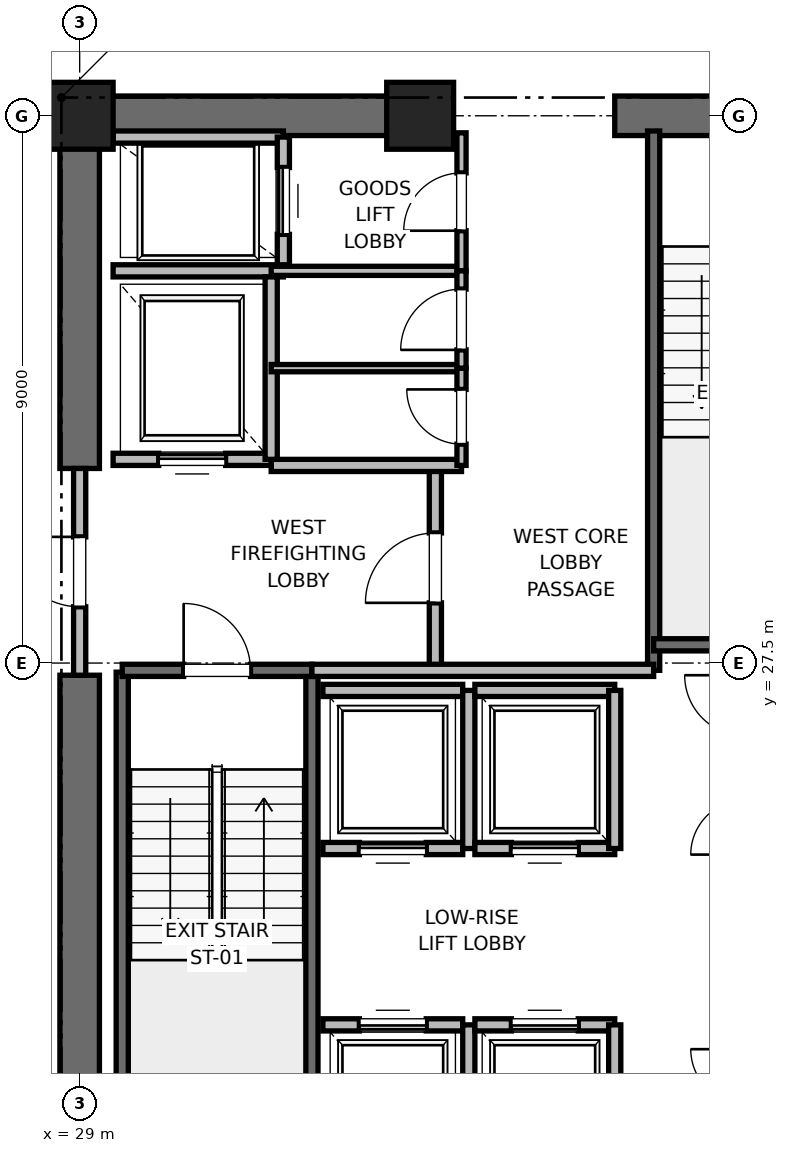
"""IFC4 building model, lengths in metres.
Left out: names, types, materials, properties, quantities, classifications, styles, units other than length and angle.
Written with IfcOpenShell. Run it as: python <this file> out.ifc"""

import sys

from ifc_helpers import new_model, si_unit, direction, frame, frame_2d, origin, origin_2d, place, context, subcontext, project, spatial, rectangle, extrude, element, fill, save


model = new_model("IFC4")
c1 = context("Model", 3, precision=1e-05, world=origin(), true_north=direction((0.0, 1.0)))
c2 = subcontext(c1, "Body", "Model", "MODEL_VIEW")
j1 = project(units=[si_unit("LENGTHUNIT", "METRE"), si_unit("PLANEANGLEUNIT", "RADIAN")], contexts=[c1])
p1 = place(None, origin())
s1 = spatial("IfcSite", under=j1, at=p1, CompositionType="ELEMENT")
p2 = place(p1, origin())
s2 = spatial("IfcBuilding", under=s1, at=p2, CompositionType="ELEMENT")
p3 = place(p2, frame((0.0, 0.0, 75.6)))
s3 = spatial("IfcBuildingStorey", under=s2, at=p3, CompositionType="ELEMENT", Elevation=75.6)
for number, where, z_axis, x_axis in (
    (1, (29.0, 36.5, 0.0), (0.0, 0.0, 1.0), (1.0, 0.0, 0.0)),
    (2, (34.6, 36.5, 0.0), (0.0, 0.0, 1.0), (1.0, 0.0, 0.0)),
):
    element("IfcColumn", number, at=place(p3, frame(where, z_axis=z_axis, x_axis=x_axis)), inside=s3, PredefinedType="PILASTER", context=c2, shape_type="SweptSolid", body=[
        extrude(rectangle(XDim=1.1, YDim=1.1, at=origin_2d()), origin(), (0.0, 0.0, 1.0), 4.0),
    ])
p4 = place(p3, frame((29.0, 36.5, 0.0), z_axis=(0.0, 0.0, 1.0), x_axis=(1.0, 0.0, 0.0)))
e3 = element("IfcWall", 3, at=p4, inside=s3, PredefinedType="SHEAR", context=c2, shape_type="SweptSolid", body=[
    extrude(rectangle(XDim=5.8, YDim=0.65, at=frame_2d((2.9, 0.0))), origin(), (0.0, 0.0, 1.0), 3.76),
])
p5 = place(p3, frame((37.8, 36.5, 0.0), z_axis=(0.0, 0.0, 1.0), x_axis=(1.0, 0.0, 0.0)))
e4 = element("IfcWall", 4, at=p5, inside=s3, PredefinedType="SHEAR", context=c2, shape_type="SweptSolid", body=[
    extrude(rectangle(XDim=4.4, YDim=0.65, at=frame_2d((2.2, 0.0))), origin(), (0.0, 0.0, 1.0), 3.76),
])
p6 = place(p5, frame((1.65, 0.0, 0.0)))
e5 = element("IfcOpeningElement", 5, at=p6, cuts=e4, PredefinedType="OPENING", context=c2, shape_type="SweptSolid", body=[
    extrude(rectangle(XDim=1.1, YDim=2.15, at=frame_2d((0.55, 1.075))), frame((0.0, 0.325, 0.0), z_axis=(0.0, -1.0, 0.0), x_axis=(1.0, 0.0, 0.0)), (0.0, 0.0, 1.0), 0.65),
])
p7 = place(p3, frame((29.0, 18.5, 0.0), z_axis=(0.0, 0.0, 1.0), x_axis=(0.0, 1.0, 0.0)))
e6 = element("IfcWall", 6, at=p7, inside=s3, PredefinedType="SHEAR", context=c2, shape_type="SweptSolid", body=[
    extrude(rectangle(XDim=8.8, YDim=0.65, at=frame_2d((4.4, 0.0))), origin(), (0.0, 0.0, 1.0), 3.76),
])
p8 = place(p3, frame((29.0, 30.7, 0.0), z_axis=(0.0, 0.0, 1.0), x_axis=(0.0, 1.0, 0.0)))
e7 = element("IfcWall", 7, at=p8, inside=s3, PredefinedType="SHEAR", context=c2, shape_type="SweptSolid", body=[
    extrude(rectangle(XDim=5.8, YDim=0.65, at=frame_2d((2.9, 0.0))), origin(), (0.0, 0.0, 1.0), 3.76),
])
p9 = place(p3, frame((29.7, 19.2, 0.0), z_axis=(0.0, 0.0, 1.0), x_axis=(0.0, 1.0, 0.0)))
e8 = element("IfcWall", 8, at=p9, inside=s3, PredefinedType="SOLIDWALL", context=c2, shape_type="SweptSolid", body=[
    extrude(rectangle(XDim=8.15, YDim=0.2, at=frame_2d((4.075, 0.0))), origin(), (0.0, 0.0, 1.0), 3.76),
])
p10 = place(p3, frame((32.82, 18.6, 0.0), z_axis=(0.0, 0.0, 1.0), x_axis=(0.0, 1.0, 0.0)))
e9 = element("IfcWall", 9, at=p10, inside=s3, PredefinedType="SOLIDWALL", context=c2, shape_type="SweptSolid", body=[
    extrude(rectangle(XDim=8.78, YDim=0.2, at=frame_2d((4.39, 0.0))), origin(), (0.0, 0.0, 1.0), 3.76),
])
p11 = place(p3, frame((29.7, 27.38, 0.0), z_axis=(0.0, 0.0, 1.0), x_axis=(1.0, 0.0, 0.0)))
e10 = element("IfcWall", 10, at=p11, inside=s3, PredefinedType="SOLIDWALL", context=c2, shape_type="SweptSolid", body=[
    extrude(rectangle(XDim=3.12, YDim=0.2, at=frame_2d((1.56, 0.0))), origin(), (0.0, 0.0, 1.0), 3.76),
])
p12 = place(p11, frame((1.01, 0.0, 0.0)))
e11 = element("IfcOpeningElement", 11, at=p12, cuts=e10, PredefinedType="OPENING", context=c2, shape_type="SweptSolid", body=[
    extrude(rectangle(XDim=1.1, YDim=2.15, at=frame_2d((0.55, 1.075))), frame((0.0, 0.1, 0.0), z_axis=(0.0, -1.0, 0.0), x_axis=(1.0, 0.0, 0.0)), (0.0, 0.0, 1.0), 0.2),
])
p13 = place(p3, frame((38.44, 27.38, 0.0), z_axis=(0.0, 0.0, 1.0), x_axis=(0.0, 1.0, 0.0)))
e12 = element("IfcWall", 12, at=p13, inside=s3, PredefinedType="SOLIDWALL", context=c2, shape_type="SweptSolid", body=[
    extrude(rectangle(XDim=8.87, YDim=0.2, at=frame_2d((4.435, 0.0))), origin(), (0.0, 0.0, 1.0), 3.76),
])
p14 = place(p3, frame((38.44, 27.8, 0.0), z_axis=(0.0, 0.0, 1.0), x_axis=(1.0, 0.0, 0.0)))
e13 = element("IfcWall", 13, at=p14, inside=s3, PredefinedType="SOLIDWALL", context=c2, shape_type="SweptSolid", body=[
    extrude(rectangle(XDim=3.32, YDim=0.2, at=frame_2d((1.66, 0.0))), origin(), (0.0, 0.0, 1.0), 3.76),
])
p15 = place(p3, frame((34.85, 27.38, 0.0), z_axis=(0.0, 0.0, 1.0), x_axis=(0.0, 1.0, 0.0)))
e14 = element("IfcWall", 14, at=p15, inside=s3, PredefinedType="PARTITIONING", context=c2, shape_type="SweptSolid", body=[
    extrude(rectangle(XDim=3.37, YDim=0.2, at=frame_2d((1.685, 0.0))), origin(), (0.0, 0.0, 1.0), 3.76),
])
p16 = place(p15, frame((1.11, 0.0, 0.0)))
e15 = element("IfcOpeningElement", 15, at=p16, cuts=e14, PredefinedType="OPENING", context=c2, shape_type="SweptSolid", body=[
    extrude(rectangle(XDim=1.15, YDim=2.2, at=frame_2d((0.575, 1.1))), frame((0.0, 0.1, 0.0), z_axis=(0.0, -1.0, 0.0), x_axis=(1.0, 0.0, 0.0)), (0.0, 0.0, 1.0), 0.2),
])
p17 = place(p3, frame((29.0, 27.3, 0.0), z_axis=(0.0, 0.0, 1.0), x_axis=(0.0, 1.0, 0.0)))
e16 = element("IfcWall", 16, at=p17, inside=s3, PredefinedType="PARTITIONING", context=c2, shape_type="SweptSolid", body=[
    extrude(rectangle(XDim=3.4, YDim=0.2, at=frame_2d((1.7, 0.0))), origin(), (0.0, 0.0, 1.0), 2.54),
])
p18 = place(p17, frame((1.125, 0.0, 0.0)))
e17 = element("IfcOpeningElement", 17, at=p18, cuts=e16, PredefinedType="OPENING", context=c2, shape_type="SweptSolid", body=[
    extrude(rectangle(XDim=1.15, YDim=2.2, at=frame_2d((0.575, 1.1))), frame((0.0, 0.1, 0.0), z_axis=(0.0, -1.0, 0.0), x_axis=(1.0, 0.0, 0.0)), (0.0, 0.0, 1.0), 0.2),
])
p19 = place(p3, frame((32.82, 27.38, 0.0), z_axis=(0.0, 0.0, 1.0), x_axis=(1.0, 0.0, 0.0)))
e18 = element("IfcWall", 18, at=p19, inside=s3, PredefinedType="PARTITIONING", context=c2, shape_type="SweptSolid", body=[
    extrude(rectangle(XDim=5.62, YDim=0.2, at=frame_2d((2.81, 0.0))), origin(), (0.0, 0.0, 1.0), 3.76),
])
p20 = place(p3, frame((32.15, 30.75, 0.0), z_axis=(0.0, 0.0, 1.0), x_axis=(1.0, 0.0, 0.0)))
e19 = element("IfcWall", 19, at=p20, inside=s3, PredefinedType="PARTITIONING", context=c2, shape_type="SweptSolid", body=[
    extrude(rectangle(XDim=3.13, YDim=0.2, at=frame_2d((1.565, 0.0))), origin(), (0.0, 0.0, 1.0), 3.76),
])
p21 = place(p3, frame((29.55, 30.85, 0.0), z_axis=(0.0, 0.0, 1.0), x_axis=(1.0, 0.0, 0.0)))
e20 = element("IfcWall", 20, at=p21, inside=s3, PredefinedType="SOLIDWALL", context=c2, shape_type="SweptSolid", body=[
    extrude(rectangle(XDim=2.6, YDim=0.2, at=frame_2d((1.3, 0.0))), origin(), (0.0, 0.0, 1.0), 2.54),
])
p22 = place(p21, frame((0.75, 0.0, 0.0)))
e21 = element("IfcOpeningElement", 21, at=p22, cuts=e20, PredefinedType="OPENING", context=c2, shape_type="SweptSolid", body=[
    extrude(rectangle(XDim=1.1, YDim=2.2, at=frame_2d((0.55, 1.1))), frame((0.0, 0.1, 0.0), z_axis=(0.0, -1.0, 0.0), x_axis=(1.0, 0.0, 0.0)), (0.0, 0.0, 1.0), 0.2),
])
p23 = place(p3, frame((29.55, 33.95, 0.0), z_axis=(0.0, 0.0, 1.0), x_axis=(1.0, 0.0, 0.0)))
e22 = element("IfcWall", 22, at=p23, inside=s3, PredefinedType="SOLIDWALL", context=c2, shape_type="SweptSolid", body=[
    extrude(rectangle(XDim=2.8, YDim=0.2, at=frame_2d((1.4, 0.0))), origin(), (0.0, 0.0, 1.0), 3.76),
])
p24 = place(p3, frame((32.15, 30.85, 0.0), z_axis=(0.0, 0.0, 1.0), x_axis=(0.0, 1.0, 0.0)))
e23 = element("IfcWall", 23, at=p24, inside=s3, PredefinedType="SOLIDWALL", context=c2, shape_type="SweptSolid", body=[
    extrude(rectangle(XDim=3.0, YDim=0.2, at=frame_2d((1.5, 0.0))), origin(), (0.0, 0.0, 1.0), 3.76),
])
p25 = place(p3, frame((32.35, 36.15, 0.0), z_axis=(0.0, 0.0, 1.0), x_axis=(-1.0, 0.0, 0.0)))
e24 = element("IfcWall", 24, at=p25, inside=s3, PredefinedType="SOLIDWALL", context=c2, shape_type="SweptSolid", body=[
    extrude(rectangle(XDim=2.8, YDim=0.2, at=frame_2d((1.4, 0.0))), origin(), (0.0, 0.0, 1.0), 2.889),
])
p26 = place(p3, frame((32.35, 34.05, 0.0), z_axis=(0.0, 0.0, 1.0), x_axis=(0.0, 1.0, 0.0)))
e25 = element("IfcWall", 25, at=p26, inside=s3, PredefinedType="SOLIDWALL", context=c2, shape_type="SweptSolid", body=[
    extrude(rectangle(XDim=2.1, YDim=0.2, at=frame_2d((1.05, 0.0))), origin(), (0.0, 0.0, 1.0), 3.76),
])
p27 = place(p26, frame((0.5, 0.0, 0.0)))
e26 = element("IfcOpeningElement", 26, at=p27, cuts=e25, PredefinedType="OPENING", context=c2, shape_type="SweptSolid", body=[
    extrude(rectangle(XDim=1.1, YDim=2.2, at=frame_2d((0.55, 1.1))), frame((0.0, 0.1, 0.0), z_axis=(0.0, -1.0, 0.0), x_axis=(1.0, 0.0, 0.0)), (0.0, 0.0, 1.0), 0.2),
])
p28 = place(p3, frame((35.3, 21.55, 0.0), z_axis=(0.0, 0.0, 1.0), x_axis=(-1.0, 0.0, 0.0)))
e27 = element("IfcWall", 27, at=p28, inside=s3, PredefinedType="SOLIDWALL", context=c2, shape_type="SweptSolid", body=[
    extrude(rectangle(XDim=2.3, YDim=0.2, at=frame_2d((1.15, 0.0))), origin(), (0.0, 0.0, 1.0), 3.76),
])
p29 = place(p28, frame((0.6, 0.0, 0.0)))
e28 = element("IfcOpeningElement", 28, at=p29, cuts=e27, PredefinedType="OPENING", context=c2, shape_type="SweptSolid", body=[
    extrude(rectangle(XDim=1.1, YDim=2.2, at=frame_2d((0.55, 1.1))), frame((0.0, 0.1, 0.0), z_axis=(0.0, -1.0, 0.0), x_axis=(1.0, 0.0, 0.0)), (0.0, 0.0, 1.0), 0.2),
])
p30 = place(p3, frame((35.4, 18.95, 0.0), z_axis=(0.0, 0.0, 1.0), x_axis=(0.0, 1.0, 0.0)))
e29 = element("IfcWall", 29, at=p30, inside=s3, PredefinedType="SOLIDWALL", context=c2, shape_type="SweptSolid", body=[
    extrude(rectangle(XDim=2.6, YDim=0.2, at=frame_2d((1.3, 0.0))), origin(), (0.0, 0.0, 1.0), 3.76),
])
p31 = place(p3, frame((37.8, 21.55, 0.0), z_axis=(0.0, 0.0, 1.0), x_axis=(-1.0, 0.0, 0.0)))
e30 = element("IfcWall", 30, at=p31, inside=s3, PredefinedType="SOLIDWALL", context=c2, shape_type="SweptSolid", body=[
    extrude(rectangle(XDim=2.3, YDim=0.2, at=frame_2d((1.15, 0.0))), origin(), (0.0, 0.0, 1.0), 3.76),
])
p32 = place(p31, frame((0.6, 0.0, 0.0)))
e31 = element("IfcOpeningElement", 31, at=p32, cuts=e30, PredefinedType="OPENING", context=c2, shape_type="SweptSolid", body=[
    extrude(rectangle(XDim=1.1, YDim=2.2, at=frame_2d((0.55, 1.1))), frame((0.0, 0.1, 0.0), z_axis=(0.0, -1.0, 0.0), x_axis=(1.0, 0.0, 0.0)), (0.0, 0.0, 1.0), 0.2),
])
p33 = place(p3, frame((37.8, 18.95, 0.0), z_axis=(0.0, 0.0, 1.0), x_axis=(0.0, 1.0, 0.0)))
e32 = element("IfcWall", 32, at=p33, inside=s3, PredefinedType="SOLIDWALL", context=c2, shape_type="SweptSolid", body=[
    extrude(rectangle(XDim=2.6, YDim=0.2, at=frame_2d((1.3, 0.0))), origin(), (0.0, 0.0, 1.0), 2.54),
])
p34 = place(p3, frame((33.0, 24.45, 0.0), z_axis=(0.0, 0.0, 1.0), x_axis=(1.0, 0.0, 0.0)))
e33 = element("IfcWall", 33, at=p34, inside=s3, PredefinedType="SOLIDWALL", context=c2, shape_type="SweptSolid", body=[
    extrude(rectangle(XDim=2.3, YDim=0.2, at=frame_2d((1.15, 0.0))), origin(), (0.0, 0.0, 1.0), 3.76),
])
p35 = place(p34, frame((0.6, 0.0, 0.0)))
e34 = element("IfcOpeningElement", 34, at=p35, cuts=e33, PredefinedType="OPENING", context=c2, shape_type="SweptSolid", body=[
    extrude(rectangle(XDim=1.1, YDim=2.2, at=frame_2d((0.55, 1.1))), frame((0.0, 0.1, 0.0), z_axis=(0.0, -1.0, 0.0), x_axis=(1.0, 0.0, 0.0)), (0.0, 0.0, 1.0), 0.2),
])
p36 = place(p3, frame((35.3, 27.05, 0.0), z_axis=(0.0, 0.0, 1.0), x_axis=(-1.0, 0.0, 0.0)))
e35 = element("IfcWall", 35, at=p36, inside=s3, PredefinedType="SOLIDWALL", context=c2, shape_type="SweptSolid", body=[
    extrude(rectangle(XDim=2.3, YDim=0.2, at=frame_2d((1.15, 0.0))), origin(), (0.0, 0.0, 1.0), 3.76),
])
p37 = place(p3, frame((35.4, 24.45, 0.0), z_axis=(0.0, 0.0, 1.0), x_axis=(0.0, 1.0, 0.0)))
e36 = element("IfcWall", 36, at=p37, inside=s3, PredefinedType="SOLIDWALL", context=c2, shape_type="SweptSolid", body=[
    extrude(rectangle(XDim=2.6, YDim=0.2, at=frame_2d((1.3, 0.0))), origin(), (0.0, 0.0, 1.0), 3.76),
])
p38 = place(p3, frame((35.5, 24.45, 0.0), z_axis=(0.0, 0.0, 1.0), x_axis=(1.0, 0.0, 0.0)))
e37 = element("IfcWall", 37, at=p38, inside=s3, PredefinedType="SOLIDWALL", context=c2, shape_type="SweptSolid", body=[
    extrude(rectangle(XDim=2.3, YDim=0.2, at=frame_2d((1.15, 0.0))), origin(), (0.0, 0.0, 1.0), 3.76),
])
p39 = place(p38, frame((0.6, 0.0, 0.0)))
e38 = element("IfcOpeningElement", 38, at=p39, cuts=e37, PredefinedType="OPENING", context=c2, shape_type="SweptSolid", body=[
    extrude(rectangle(XDim=1.1, YDim=2.2, at=frame_2d((0.55, 1.1))), frame((0.0, 0.1, 0.0), z_axis=(0.0, -1.0, 0.0), x_axis=(1.0, 0.0, 0.0)), (0.0, 0.0, 1.0), 0.2),
])
p40 = place(p3, frame((37.8, 27.05, 0.0), z_axis=(0.0, 0.0, 1.0), x_axis=(-1.0, 0.0, 0.0)))
e39 = element("IfcWall", 39, at=p40, inside=s3, PredefinedType="SOLIDWALL", context=c2, shape_type="SweptSolid", body=[
    extrude(rectangle(XDim=2.3, YDim=0.2, at=frame_2d((1.15, 0.0))), origin(), (0.0, 0.0, 1.0), 3.76),
])
p41 = place(p3, frame((37.8, 24.45, 0.0), z_axis=(0.0, 0.0, 1.0), x_axis=(0.0, 1.0, 0.0)))
e40 = element("IfcWall", 40, at=p41, inside=s3, PredefinedType="SOLIDWALL", context=c2, shape_type="SweptSolid", body=[
    extrude(rectangle(XDim=2.6, YDim=0.2, at=frame_2d((1.3, 0.0))), origin(), (0.0, 0.0, 1.0), 3.76),
])
p42 = place(p3, frame((32.15, 33.95, 0.0), z_axis=(0.0, 0.0, 1.0), x_axis=(1.0, 0.0, 0.0)))
e41 = element("IfcWall", 41, at=p42, inside=s3, PredefinedType="PARTITIONING", context=c2, shape_type="SweptSolid", body=[
    extrude(rectangle(XDim=3.13, YDim=0.15, at=frame_2d((1.565, 0.0))), origin(), (0.0, 0.0, 1.0), 2.85),
])
p43 = place(p3, frame((35.28, 33.95, 0.0), z_axis=(0.0, 0.0, 1.0), x_axis=(0.0, 1.0, 0.0)))
e42 = element("IfcWall", 42, at=p43, inside=s3, PredefinedType="PARTITIONING", context=c2, shape_type="SweptSolid", body=[
    extrude(rectangle(XDim=2.27, YDim=0.15, at=frame_2d((1.135, 0.0))), origin(), (0.0, 0.0, 1.0), 2.54),
])
p44 = place(p43, frame((0.66, 0.0, 0.0)))
e43 = element("IfcOpeningElement", 43, at=p44, cuts=e42, PredefinedType="OPENING", context=c2, shape_type="SweptSolid", body=[
    extrude(rectangle(XDim=0.95, YDim=2.15, at=frame_2d((0.475, 1.075))), frame((0.0, 0.075, 0.0), z_axis=(0.0, -1.0, 0.0), x_axis=(1.0, 0.0, 0.0)), (0.0, 0.0, 1.0), 0.15),
])
p45 = place(p3, frame((32.15, 32.35, 0.0), z_axis=(0.0, 0.0, 1.0), x_axis=(1.0, 0.0, 0.0)))
e44 = element("IfcWall", 44, at=p45, inside=s3, PredefinedType="PARTITIONING", context=c2, shape_type="SweptSolid", body=[
    extrude(rectangle(XDim=3.13, YDim=0.12, at=frame_2d((1.565, 0.0))), origin(), (0.0, 0.0, 1.0), 2.85),
])
p46 = place(p3, frame((35.28, 30.75, 0.0), z_axis=(0.0, 0.0, 1.0), x_axis=(0.0, 1.0, 0.0)))
e45 = element("IfcWall", 45, at=p46, inside=s3, PredefinedType="PARTITIONING", context=c2, shape_type="SweptSolid", body=[
    extrude(rectangle(XDim=1.6, YDim=0.15, at=frame_2d((0.8, 0.0))), origin(), (0.0, 0.0, 1.0), 2.85),
])
p47 = place(p46, frame((0.35, 0.0, 0.0)))
e46 = element("IfcOpeningElement", 46, at=p47, cuts=e45, PredefinedType="OPENING", context=c2, shape_type="SweptSolid", body=[
    extrude(rectangle(XDim=0.9, YDim=2.1, at=frame_2d((0.45, 1.05))), frame((0.0, 0.075, 0.0), z_axis=(0.0, -1.0, 0.0), x_axis=(1.0, 0.0, 0.0)), (0.0, 0.0, 1.0), 0.15),
])
p48 = place(p3, frame((35.28, 32.35, 0.0), z_axis=(0.0, 0.0, 1.0), x_axis=(0.0, 1.0, 0.0)))
e47 = element("IfcWall", 47, at=p48, inside=s3, PredefinedType="PARTITIONING", context=c2, shape_type="SweptSolid", body=[
    extrude(rectangle(XDim=1.6, YDim=0.15, at=frame_2d((0.8, 0.0))), origin(), (0.0, 0.0, 1.0), 2.85),
])
p49 = place(p48, frame((0.3, 0.0, 0.0)))
e48 = element("IfcOpeningElement", 48, at=p49, cuts=e47, PredefinedType="OPENING", context=c2, shape_type="SweptSolid", body=[
    extrude(rectangle(XDim=1.0, YDim=2.15, at=frame_2d((0.5, 1.075))), frame((0.0, 0.075, 0.0), z_axis=(0.0, -1.0, 0.0), x_axis=(1.0, 0.0, 0.0)), (0.0, 0.0, 1.0), 0.15),
])
p50 = place(p12, origin())
e49 = element("IfcDoor", 49, at=p50, inside=s3, OperationType="SINGLE_SWING_LEFT", PredefinedType="DOOR", context=c2, shape_type="SweptSolid", body=[
    extrude(rectangle(XDim=1.1, YDim=2.15, at=frame_2d((0.55, 1.075))), frame((0.0, 0.025, 0.0), z_axis=(0.0, -1.0, 0.0), x_axis=(1.0, 0.0, 0.0)), (0.0, 0.0, 1.0), 0.05),
])
fill(e11, e49)
p51 = place(p16, origin())
e50 = element("IfcDoor", 50, at=p51, inside=s3, OperationType="SINGLE_SWING_LEFT", PredefinedType="DOOR", context=c2, shape_type="SweptSolid", body=[
    extrude(rectangle(XDim=1.15, YDim=2.2, at=frame_2d((0.575, 1.1))), frame((0.0, 0.025, 0.0), z_axis=(0.0, -1.0, 0.0), x_axis=(1.0, 0.0, 0.0)), (0.0, 0.0, 1.0), 0.05),
])
fill(e15, e50)
p52 = place(p18, origin())
e51 = element("IfcDoor", 51, at=p52, inside=s3, OperationType="SINGLE_SWING_RIGHT", PredefinedType="DOOR", context=c2, shape_type="SweptSolid", body=[
    extrude(rectangle(XDim=1.15, YDim=2.2, at=frame_2d((0.575, 1.1))), frame((0.0, 0.025, 0.0), z_axis=(0.0, -1.0, 0.0), x_axis=(1.0, 0.0, 0.0)), (0.0, 0.0, 1.0), 0.05),
])
fill(e17, e51)
p53 = place(p22, origin())
e52 = element("IfcDoor", 52, at=p53, inside=s3, OperationType="SLIDING_TO_RIGHT", PredefinedType="DOOR", context=c2, shape_type="SweptSolid", body=[
    extrude(rectangle(XDim=1.1, YDim=2.2, at=frame_2d((0.55, 1.1))), frame((0.0, 0.025, 0.0), z_axis=(0.0, -1.0, 0.0), x_axis=(1.0, 0.0, 0.0)), (0.0, 0.0, 1.0), 0.05),
])
fill(e21, e52)
p54 = place(p27, origin())
e53 = element("IfcDoor", 53, at=p54, inside=s3, OperationType="SLIDING_TO_RIGHT", PredefinedType="DOOR", context=c2, shape_type="SweptSolid", body=[
    extrude(rectangle(XDim=1.1, YDim=2.2, at=frame_2d((0.55, 1.1))), frame((0.0, 0.025, 0.0), z_axis=(0.0, -1.0, 0.0), x_axis=(1.0, 0.0, 0.0)), (0.0, 0.0, 1.0), 0.05),
])
fill(e26, e53)
p55 = place(p29, origin())
e54 = element("IfcDoor", 54, at=p55, inside=s3, OperationType="SLIDING_TO_RIGHT", PredefinedType="DOOR", context=c2, shape_type="SweptSolid", body=[
    extrude(rectangle(XDim=1.1, YDim=2.2, at=frame_2d((0.55, 1.1))), frame((0.0, 0.025, 0.0), z_axis=(0.0, -1.0, 0.0), x_axis=(1.0, 0.0, 0.0)), (0.0, 0.0, 1.0), 0.05),
])
fill(e28, e54)
p56 = place(p32, origin())
e55 = element("IfcDoor", 55, at=p56, inside=s3, OperationType="SLIDING_TO_RIGHT", PredefinedType="DOOR", context=c2, shape_type="SweptSolid", body=[
    extrude(rectangle(XDim=1.1, YDim=2.2, at=frame_2d((0.55, 1.1))), frame((0.0, 0.025, 0.0), z_axis=(0.0, -1.0, 0.0), x_axis=(1.0, 0.0, 0.0)), (0.0, 0.0, 1.0), 0.05),
])
fill(e31, e55)
p57 = place(p35, origin())
e56 = element("IfcDoor", 56, at=p57, inside=s3, OperationType="SLIDING_TO_RIGHT", PredefinedType="DOOR", context=c2, shape_type="SweptSolid", body=[
    extrude(rectangle(XDim=1.1, YDim=2.2, at=frame_2d((0.55, 1.1))), frame((0.0, 0.025, 0.0), z_axis=(0.0, -1.0, 0.0), x_axis=(1.0, 0.0, 0.0)), (0.0, 0.0, 1.0), 0.05),
])
fill(e34, e56)
p58 = place(p39, origin())
e57 = element("IfcDoor", 57, at=p58, inside=s3, OperationType="SLIDING_TO_RIGHT", PredefinedType="DOOR", context=c2, shape_type="SweptSolid", body=[
    extrude(rectangle(XDim=1.1, YDim=2.2, at=frame_2d((0.55, 1.1))), frame((0.0, 0.025, 0.0), z_axis=(0.0, -1.0, 0.0), x_axis=(1.0, 0.0, 0.0)), (0.0, 0.0, 1.0), 0.05),
])
fill(e38, e57)
p59 = place(p44, origin())
e58 = element("IfcDoor", 58, at=p59, inside=s3, OperationType="SINGLE_SWING_LEFT", PredefinedType="DOOR", context=c2, shape_type="SweptSolid", body=[
    extrude(rectangle(XDim=0.95, YDim=2.15, at=frame_2d((0.475, 1.075))), frame((0.0, 0.025, 0.0), z_axis=(0.0, -1.0, 0.0), x_axis=(1.0, 0.0, 0.0)), (0.0, 0.0, 1.0), 0.05),
])
fill(e43, e58)
p60 = place(p47, origin())
e59 = element("IfcDoor", 59, at=p60, inside=s3, OperationType="SINGLE_SWING_RIGHT", PredefinedType="DOOR", context=c2, shape_type="SweptSolid", body=[
    extrude(rectangle(XDim=0.9, YDim=2.1, at=frame_2d((0.45, 1.05))), frame((0.0, 0.025, 0.0), z_axis=(0.0, -1.0, 0.0), x_axis=(1.0, 0.0, 0.0)), (0.0, 0.0, 1.0), 0.05),
])
fill(e46, e59)
p61 = place(p49, origin())
e60 = element("IfcDoor", 60, at=p61, inside=s3, OperationType="SINGLE_SWING_LEFT", PredefinedType="DOOR", context=c2, shape_type="SweptSolid", body=[
    extrude(rectangle(XDim=1.0, YDim=2.15, at=frame_2d((0.5, 1.075))), frame((0.0, 0.025, 0.0), z_axis=(0.0, -1.0, 0.0), x_axis=(1.0, 0.0, 0.0)), (0.0, 0.0, 1.0), 0.05),
])
fill(e48, e60)
save(model, sys.argv[1])
